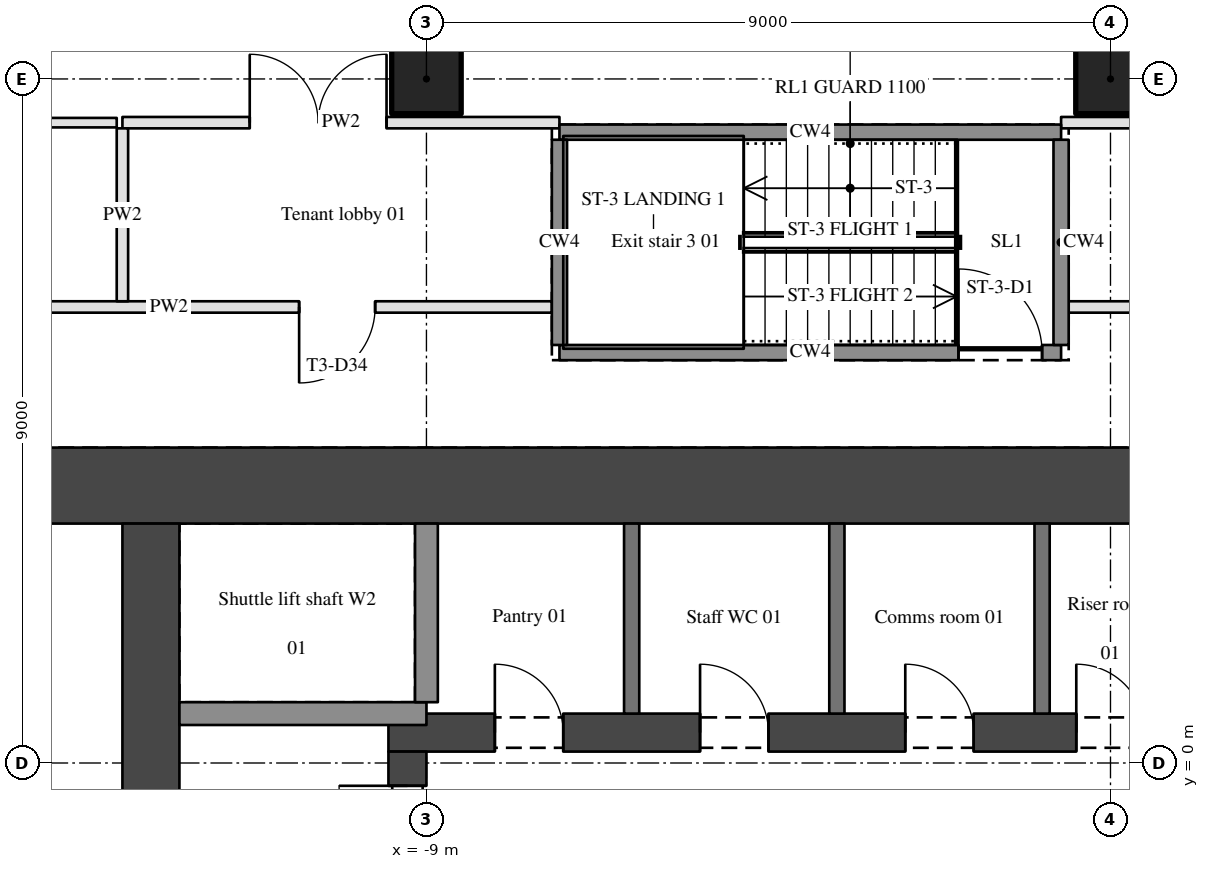
"""IFC4 building model, lengths in metres.
Left out: names, types, materials, properties, quantities, classifications, styles, units other than length and angle.
Written with IfcOpenShell. Run it as: python <this file> out.ifc"""

import sys

from ifc_helpers import new_model, si_unit, direction, frame, frame_2d, origin, origin_2d, place, context, subcontext, project, spatial, rectangle, hollow_circle, extrude, element, fill, save


model = new_model("IFC4")
c1 = context("Model", 3, precision=1e-05, world=origin(), true_north=direction((0.0, 1.0)))
c2 = subcontext(c1, "Body", "Model", "MODEL_VIEW")
j1 = project(units=[si_unit("LENGTHUNIT", "METRE"), si_unit("PLANEANGLEUNIT", "RADIAN")], contexts=[c1])
p1 = place(None, origin())
s1 = spatial("IfcSite", under=j1, at=p1, CompositionType="ELEMENT")
p2 = place(p1, origin())
s2 = spatial("IfcBuilding", under=s1, at=p2, CompositionType="ELEMENT")
p3 = place(p2, frame((0.0, 0.0, 53.7)))
s3 = spatial("IfcBuildingStorey", under=s2, at=p3, CompositionType="ELEMENT", Elevation=53.7)
for number, where, z_axis, x_axis in (
    (1, (-9.0, 9.0, 0.0), (0.0, 0.0, 1.0), (1.0, 0.0, 0.0)),
    (2, (0.0, 9.0, 0.0), (0.0, 0.0, 1.0), (1.0, 0.0, 0.0)),
):
    element("IfcColumn", number, at=place(p3, frame(where, z_axis=z_axis, x_axis=x_axis)), inside=s3, PredefinedType="COLUMN", context=c2, shape_type="SweptSolid", body=[
        extrude(hollow_circle(Radius=0.457, WallThickness=0.05, at=origin_2d()), origin(), (0.0, 0.0, 1.0), 3.9),
    ])
p4 = place(p3, frame((-15.0, 3.65, 0.0), z_axis=(0.0, 0.0, 1.0), x_axis=(1.0, 0.0, 0.0)))
e3 = element("IfcWall", 3, at=p4, inside=s3, PredefinedType="SHEAR", context=c2, shape_type="SweptSolid", body=[
    extrude(rectangle(XDim=30.0, YDim=1.0, at=frame_2d((15.0, 0.0))), origin(), (0.0, 0.0, 1.0), 3.9),
])
p5 = place(p3, frame((-12.625, -11.5, 0.0), z_axis=(0.0, 0.0, 1.0), x_axis=(0.0, 1.0, 0.0)))
e4 = element("IfcWall", 4, at=p5, inside=s3, PredefinedType="SHEAR", context=c2, shape_type="SweptSolid", body=[
    extrude(rectangle(XDim=14.65, YDim=0.75, at=frame_2d((7.325, 0.0))), origin(), (0.0, 0.0, 1.0), 3.9),
])
p6 = place(p5, frame((10.05, 0.0, 0.0)))
e5 = element("IfcOpeningElement", 5, at=p6, cuts=e4, PredefinedType="OPENING", context=c2, shape_type="SweptSolid", body=[
    extrude(rectangle(XDim=0.9, YDim=2.1, at=frame_2d((0.45, 1.05))), frame((0.0, 0.385, 0.0), z_axis=(0.0, -1.0, 0.0), x_axis=(1.0, 0.0, 0.0)), (0.0, 0.0, 1.0), 0.77),
])
p7 = place(p3, frame((-9.5, 0.4, 0.0), z_axis=(0.0, 0.0, 1.0), x_axis=(1.0, 0.0, 0.0)))
e6 = element("IfcWall", 6, at=p7, inside=s3, PredefinedType="SHEAR", context=c2, shape_type="SweptSolid", body=[
    extrude(rectangle(XDim=19.0, YDim=0.5, at=frame_2d((9.5, 0.0))), origin(), (0.0, 0.0, 1.0), 3.9),
])
p8 = place(p7, frame((1.4, 0.0, 0.0)))
e7 = element("IfcOpeningElement", 7, at=p8, cuts=e6, PredefinedType="OPENING", context=c2, shape_type="SweptSolid", body=[
    extrude(rectangle(XDim=0.9, YDim=2.1, at=frame_2d((0.45, 1.05))), frame((0.0, 0.26, 0.0), z_axis=(0.0, -1.0, 0.0), x_axis=(1.0, 0.0, 0.0)), (0.0, 0.0, 1.0), 0.52),
])
p9 = place(p7, frame((4.1, 0.0, 0.0)))
e8 = element("IfcOpeningElement", 8, at=p9, cuts=e6, PredefinedType="OPENING", context=c2, shape_type="SweptSolid", body=[
    extrude(rectangle(XDim=0.9, YDim=2.1, at=frame_2d((0.45, 1.05))), frame((0.0, 0.26, 0.0), z_axis=(0.0, -1.0, 0.0), x_axis=(1.0, 0.0, 0.0)), (0.0, 0.0, 1.0), 0.52),
])
p10 = place(p7, frame((6.8, 0.0, 0.0)))
e9 = element("IfcOpeningElement", 9, at=p10, cuts=e6, PredefinedType="OPENING", context=c2, shape_type="SweptSolid", body=[
    extrude(rectangle(XDim=0.9, YDim=2.1, at=frame_2d((0.45, 1.05))), frame((0.0, 0.26, 0.0), z_axis=(0.0, -1.0, 0.0), x_axis=(1.0, 0.0, 0.0)), (0.0, 0.0, 1.0), 0.52),
])
p11 = place(p7, frame((11.3, 0.0, 0.0)))
e10 = element("IfcOpeningElement", 10, at=p11, cuts=e6, PredefinedType="OPENING", context=c2, shape_type="SweptSolid", body=[
    extrude(rectangle(XDim=0.9, YDim=2.1, at=frame_2d((0.45, 1.05))), frame((0.0, 0.26, 0.0), z_axis=(0.0, -1.0, 0.0), x_axis=(1.0, 0.0, 0.0)), (0.0, 0.0, 1.0), 0.52),
])
p12 = place(p7, frame((14.0, 0.0, 0.0)))
e11 = element("IfcOpeningElement", 11, at=p12, cuts=e6, PredefinedType="OPENING", context=c2, shape_type="SweptSolid", body=[
    extrude(rectangle(XDim=0.9, YDim=2.1, at=frame_2d((0.45, 1.05))), frame((0.0, 0.26, 0.0), z_axis=(0.0, -1.0, 0.0), x_axis=(1.0, 0.0, 0.0)), (0.0, 0.0, 1.0), 0.52),
])
p13 = place(p7, frame((16.7, 0.0, 0.0)))
e12 = element("IfcOpeningElement", 12, at=p13, cuts=e6, PredefinedType="OPENING", context=c2, shape_type="SweptSolid", body=[
    extrude(rectangle(XDim=0.9, YDim=2.1, at=frame_2d((0.45, 1.05))), frame((0.0, 0.26, 0.0), z_axis=(0.0, -1.0, 0.0), x_axis=(1.0, 0.0, 0.0)), (0.0, 0.0, 1.0), 0.52),
])
p14 = place(p7, frame((9.05, 0.0, 0.0)))
e13 = element("IfcOpeningElement", 13, at=p14, cuts=e6, PredefinedType="OPENING", context=c2, shape_type="SweptSolid", body=[
    extrude(rectangle(XDim=0.9, YDim=2.1, at=frame_2d((0.45, 1.05))), frame((0.0, 0.26, 0.0), z_axis=(0.0, -1.0, 0.0), x_axis=(1.0, 0.0, 0.0)), (0.0, 0.0, 1.0), 0.52),
])
p15 = place(p3, frame((-9.25, -11.5, 0.0), z_axis=(0.0, 0.0, 1.0), x_axis=(0.0, 1.0, 0.0)))
e14 = element("IfcWall", 14, at=p15, inside=s3, PredefinedType="SHEAR", context=c2, shape_type="SweptSolid", body=[
    extrude(rectangle(XDim=11.65, YDim=0.5, at=frame_2d((5.825, 0.0))), origin(), (0.0, 0.0, 1.0), 3.9),
])
p16 = place(p15, frame((9.4, 0.0, 0.0)))
e15 = element("IfcOpeningElement", 15, at=p16, cuts=e14, PredefinedType="OPENING", context=c2, shape_type="SweptSolid", body=[
    extrude(rectangle(XDim=1.8, YDim=2.1, at=frame_2d((0.9, 1.05))), frame((0.0, 0.26, 0.0), z_axis=(0.0, -1.0, 0.0), x_axis=(1.0, 0.0, 0.0)), (0.0, 0.0, 1.0), 0.52),
])
p17 = place(p15, frame((5.25, 0.0, 0.0)))
e16 = element("IfcOpeningElement", 16, at=p17, cuts=e14, PredefinedType="OPENING", context=c2, shape_type="SweptSolid", body=[
    extrude(rectangle(XDim=1.1, YDim=2.1, at=frame_2d((0.55, 1.05))), frame((0.0, 0.26, 0.0), z_axis=(0.0, -1.0, 0.0), x_axis=(1.0, 0.0, 0.0)), (0.0, 0.0, 1.0), 0.52),
])
p18 = place(p3, frame((-9.0, 0.65, 0.0), z_axis=(0.0, 0.0, 1.0), x_axis=(-1.0, 0.0, 0.0)))
e17 = element("IfcWall", 17, at=p18, inside=s3, PredefinedType="SHEAR", context=c2, shape_type="SweptSolid", body=[
    extrude(rectangle(XDim=3.25, YDim=0.3, at=frame_2d((1.625, 0.0))), origin(), (0.0, 0.0, 1.0), 3.9),
])
p19 = place(p3, frame((-7.25, 5.4, 0.0), z_axis=(0.0, 0.0, 1.0), x_axis=(1.0, 0.0, 0.0)))
e18 = element("IfcWall", 18, at=p19, inside=s3, PredefinedType="SHEAR", context=c2, shape_type="SweptSolid", body=[
    extrude(rectangle(XDim=6.6, YDim=0.2, at=frame_2d((3.3, 0.0))), origin(), (0.0, 0.0, 1.0), 3.9),
])
p20 = place(p19, frame((5.25, 0.0, 0.0)))
e19 = element("IfcOpeningElement", 19, at=p20, cuts=e18, PredefinedType="OPENING", context=c2, shape_type="SweptSolid", body=[
    extrude(rectangle(XDim=1.1, YDim=2.1, at=frame_2d((0.55, 1.05))), frame((0.0, 0.11, 0.0), z_axis=(0.0, -1.0, 0.0), x_axis=(1.0, 0.0, 0.0)), (0.0, 0.0, 1.0), 0.22),
])
p21 = place(p3, frame((-7.35, 6.0, 0.0), z_axis=(0.0, 0.0, 1.0), x_axis=(-1.0, 0.0, 0.0)))
e20 = element("IfcWall", 20, at=p21, inside=s3, PredefinedType="PARTITIONING", context=c2, shape_type="SweptSolid", body=[
    extrude(rectangle(XDim=10.075, YDim=0.15, at=frame_2d((5.038, 0.0))), origin(), (0.0, 0.0, 1.0), 2.96),
])
p22 = place(p21, frame((2.325, 0.0, 0.0)))
e21 = element("IfcOpeningElement", 21, at=p22, cuts=e20, PredefinedType="OPENING", context=c2, shape_type="SweptSolid", body=[
    extrude(rectangle(XDim=1.0, YDim=2.1, at=frame_2d((0.5, 1.05))), frame((0.0, 0.085, 0.0), z_axis=(0.0, -1.0, 0.0), x_axis=(1.0, 0.0, 0.0)), (0.0, 0.0, 1.0), 0.17),
])
p23 = place(p21, frame((7.413, 0.0, 0.0)))
e22 = element("IfcOpeningElement", 22, at=p23, cuts=e20, PredefinedType="OPENING", context=c2, shape_type="SweptSolid", body=[
    extrude(rectangle(XDim=0.9, YDim=2.1, at=frame_2d((0.45, 1.05))), frame((0.0, 0.085, 0.0), z_axis=(0.0, -1.0, 0.0), x_axis=(1.0, 0.0, 0.0)), (0.0, 0.0, 1.0), 0.17),
])
p24 = place(p3, frame((-0.55, 6.0, 0.0), z_axis=(0.0, 0.0, 1.0), x_axis=(1.0, 0.0, 0.0)))
e23 = element("IfcWall", 23, at=p24, inside=s3, PredefinedType="PARTITIONING", context=c2, shape_type="SweptSolid", body=[
    extrude(rectangle(XDim=17.975, YDim=0.15, at=frame_2d((8.988, 0.0))), origin(), (0.0, 0.0, 1.0), 2.96),
])
p25 = place(p24, frame((1.525, 0.0, 0.0)))
e24 = element("IfcOpeningElement", 24, at=p25, cuts=e23, PredefinedType="OPENING", context=c2, shape_type="SweptSolid", body=[
    extrude(rectangle(XDim=0.9, YDim=2.1, at=frame_2d((0.45, 1.05))), frame((0.0, 0.085, 0.0), z_axis=(0.0, -1.0, 0.0), x_axis=(1.0, 0.0, 0.0)), (0.0, 0.0, 1.0), 0.17),
])
p26 = place(p24, frame((5.8, 0.0, 0.0)))
e25 = element("IfcOpeningElement", 25, at=p26, cuts=e23, PredefinedType="OPENING", context=c2, shape_type="SweptSolid", body=[
    extrude(rectangle(XDim=0.9, YDim=2.1, at=frame_2d((0.45, 1.05))), frame((0.0, 0.085, 0.0), z_axis=(0.0, -1.0, 0.0), x_axis=(1.0, 0.0, 0.0)), (0.0, 0.0, 1.0), 0.17),
])
p27 = place(p24, frame((9.55, 0.0, 0.0)))
e26 = element("IfcOpeningElement", 26, at=p27, cuts=e23, PredefinedType="OPENING", context=c2, shape_type="SweptSolid", body=[
    extrude(rectangle(XDim=1.0, YDim=2.1, at=frame_2d((0.5, 1.05))), frame((0.0, 0.085, 0.0), z_axis=(0.0, -1.0, 0.0), x_axis=(1.0, 0.0, 0.0)), (0.0, 0.0, 1.0), 0.17),
])
p28 = place(p24, frame((12.6, 0.0, 0.0)))
e27 = element("IfcOpeningElement", 27, at=p28, cuts=e23, PredefinedType="OPENING", context=c2, shape_type="SweptSolid", body=[
    extrude(rectangle(XDim=0.9, YDim=2.1, at=frame_2d((0.45, 1.05))), frame((0.0, 0.085, 0.0), z_axis=(0.0, -1.0, 0.0), x_axis=(1.0, 0.0, 0.0)), (0.0, 0.0, 1.0), 0.17),
])
p29 = place(p24, frame((15.812, 0.0, 0.0)))
e28 = element("IfcOpeningElement", 28, at=p29, cuts=e23, PredefinedType="OPENING", context=c2, shape_type="SweptSolid", body=[
    extrude(rectangle(XDim=0.9, YDim=2.1, at=frame_2d((0.45, 1.05))), frame((0.0, 0.085, 0.0), z_axis=(0.0, -1.0, 0.0), x_axis=(1.0, 0.0, 0.0)), (0.0, 0.0, 1.0), 0.17),
])
p30 = place(p3, frame((-7.25, 8.3, 0.0), z_axis=(0.0, 0.0, 1.0), x_axis=(1.0, 0.0, 0.0)))
e29 = element("IfcWall", 29, at=p30, inside=s3, PredefinedType="SHEAR", context=c2, shape_type="SweptSolid", body=[
    extrude(rectangle(XDim=6.6, YDim=0.2, at=frame_2d((3.3, 0.0))), origin(), (0.0, 0.0, 1.0), 3.9),
])
p31 = place(p3, frame((-17.363, 8.425, 0.0), z_axis=(0.0, 0.0, 1.0), x_axis=(1.0, 0.0, 0.0)))
e30 = element("IfcWall", 30, at=p31, inside=s3, PredefinedType="PARTITIONING", context=c2, shape_type="SweptSolid", body=[
    extrude(rectangle(XDim=4.288, YDim=0.125, at=frame_2d((2.144, 0.0))), origin(), (0.0, 0.0, 1.0), 2.96),
])
p32 = place(p3, frame((-13.0, 8.425, 0.0), z_axis=(0.0, 0.0, 1.0), x_axis=(1.0, 0.0, 0.0)))
e31 = element("IfcWall", 31, at=p32, inside=s3, PredefinedType="PARTITIONING", context=c2, shape_type="SweptSolid", body=[
    extrude(rectangle(XDim=5.75, YDim=0.15, at=frame_2d((2.875, 0.0))), origin(), (0.0, 0.0, 1.0), 2.96),
])
p33 = place(p32, frame((1.675, 0.0, 0.0)))
e32 = element("IfcOpeningElement", 32, at=p33, cuts=e31, PredefinedType="OPENING", context=c2, shape_type="SweptSolid", body=[
    extrude(rectangle(XDim=1.8, YDim=2.1, at=frame_2d((0.9, 1.05))), frame((0.0, 0.085, 0.0), z_axis=(0.0, -1.0, 0.0), x_axis=(1.0, 0.0, 0.0)), (0.0, 0.0, 1.0), 0.17),
])
p34 = place(p3, frame((-0.65, 8.425, 0.0), z_axis=(0.0, 0.0, 1.0), x_axis=(1.0, 0.0, 0.0)))
e33 = element("IfcWall", 33, at=p34, inside=s3, PredefinedType="PARTITIONING", context=c2, shape_type="SweptSolid", body=[
    extrude(rectangle(XDim=11.65, YDim=0.15, at=frame_2d((5.825, 0.0))), origin(), (0.0, 0.0, 1.0), 2.96),
])
p35 = place(p3, frame((-13.0, 6.075, 0.0), z_axis=(0.0, 0.0, 1.0), x_axis=(0.0, 1.0, 0.0)))
e34 = element("IfcWall", 34, at=p35, inside=s3, PredefinedType="PARTITIONING", context=c2, shape_type="SweptSolid", body=[
    extrude(rectangle(XDim=2.275, YDim=0.15, at=frame_2d((1.138, 0.0))), origin(), (0.0, 0.0, 1.0), 2.96),
])
p36 = place(p3, frame((-9.0, 0.8, 0.0), z_axis=(0.0, 0.0, 1.0), x_axis=(0.0, 1.0, 0.0)))
e35 = element("IfcWall", 35, at=p36, inside=s3, PredefinedType="SHEAR", context=c2, shape_type="SweptSolid", body=[
    extrude(rectangle(XDim=2.35, YDim=0.3, at=frame_2d((1.175, 0.0))), origin(), (0.0, 0.0, 1.0), 3.9),
])
p37 = place(p3, frame((-7.25, 5.5, 0.0), z_axis=(0.0, 0.0, 1.0), x_axis=(0.0, 1.0, 0.0)))
e36 = element("IfcWall", 36, at=p37, inside=s3, PredefinedType="SHEAR", context=c2, shape_type="SweptSolid", body=[
    extrude(rectangle(XDim=2.7, YDim=0.2, at=frame_2d((1.35, 0.0))), origin(), (0.0, 0.0, 1.0), 3.9),
])
for number, where, z_axis, x_axis in (
    (37, (-6.3, 0.65, 0.0), (0.0, 0.0, 1.0), (0.0, 1.0, 0.0)),
    (38, (-3.6, 0.65, 0.0), (0.0, 0.0, 1.0), (0.0, 1.0, 0.0)),
    (39, (-0.9, 0.65, 0.0), (0.0, 0.0, 1.0), (0.0, 1.0, 0.0)),
):
    element("IfcWall", number, at=place(p3, frame(where, z_axis=z_axis, x_axis=x_axis)), inside=s3, PredefinedType="SOLIDWALL", context=c2, shape_type="SweptSolid", body=[
        extrude(rectangle(XDim=2.5, YDim=0.2, at=frame_2d((1.25, 0.0))), origin(), (0.0, 0.0, 1.0), 3.6),
    ])
p38 = place(p3, frame((-0.65, 5.5, 0.0), z_axis=(0.0, 0.0, 1.0), x_axis=(0.0, 1.0, 0.0)))
e40 = element("IfcWall", 40, at=p38, inside=s3, PredefinedType="SHEAR", context=c2, shape_type="SweptSolid", body=[
    extrude(rectangle(XDim=2.7, YDim=0.2, at=frame_2d((1.35, 0.0))), origin(), (0.0, 0.0, 1.0), 3.9),
])
p39 = place(p22, origin())
e41 = element("IfcDoor", 41, at=p39, inside=s3, OperationType="SINGLE_SWING_RIGHT", PredefinedType="DOOR", context=c2, shape_type="SweptSolid", body=[
    extrude(rectangle(XDim=1.0, YDim=2.1, at=frame_2d((0.5, 1.05))), frame((0.0, 0.025, 0.0), z_axis=(0.0, -1.0, 0.0), x_axis=(1.0, 0.0, 0.0)), (0.0, 0.0, 1.0), 0.05),
])
fill(e21, e41)
p40 = place(p16, origin())
e42 = element("IfcDoor", 42, at=p40, inside=s3, OperationType="DOUBLE_DOOR_SINGLE_SWING", PredefinedType="DOOR", context=c2, shape_type="SweptSolid", body=[
    extrude(rectangle(XDim=1.8, YDim=2.1, at=frame_2d((0.9, 1.05))), frame((0.0, 0.025, 0.0), z_axis=(0.0, -1.0, 0.0), x_axis=(1.0, 0.0, 0.0)), (0.0, 0.0, 1.0), 0.05),
])
fill(e15, e42)
p41 = place(p33, origin())
e43 = element("IfcDoor", 43, at=p41, inside=s3, OperationType="DOUBLE_DOOR_SINGLE_SWING", PredefinedType="DOOR", context=c2, shape_type="SweptSolid", body=[
    extrude(rectangle(XDim=1.8, YDim=2.1, at=frame_2d((0.9, 1.05))), frame((0.0, 0.025, 0.0), z_axis=(0.0, -1.0, 0.0), x_axis=(1.0, 0.0, 0.0)), (0.0, 0.0, 1.0), 0.05),
])
fill(e32, e43)
p42 = place(p20, origin())
e44 = element("IfcDoor", 44, at=p42, inside=s3, OperationType="SINGLE_SWING_LEFT", PredefinedType="DOOR", context=c2, shape_type="SweptSolid", body=[
    extrude(rectangle(XDim=1.1, YDim=2.1, at=frame_2d((0.55, 1.05))), frame((0.0, 0.025, 0.0), z_axis=(0.0, -1.0, 0.0), x_axis=(1.0, 0.0, 0.0)), (0.0, 0.0, 1.0), 0.05),
])
fill(e19, e44)
p43 = place(p8, origin())
e45 = element("IfcDoor", 45, at=p43, inside=s3, OperationType="SINGLE_SWING_LEFT", PredefinedType="DOOR", context=c2, shape_type="SweptSolid", body=[
    extrude(rectangle(XDim=0.9, YDim=2.1, at=frame_2d((0.45, 1.05))), frame((0.0, 0.025, 0.0), z_axis=(0.0, -1.0, 0.0), x_axis=(1.0, 0.0, 0.0)), (0.0, 0.0, 1.0), 0.05),
])
fill(e7, e45)
p44 = place(p9, origin())
e46 = element("IfcDoor", 46, at=p44, inside=s3, OperationType="SINGLE_SWING_LEFT", PredefinedType="DOOR", context=c2, shape_type="SweptSolid", body=[
    extrude(rectangle(XDim=0.9, YDim=2.1, at=frame_2d((0.45, 1.05))), frame((0.0, 0.025, 0.0), z_axis=(0.0, -1.0, 0.0), x_axis=(1.0, 0.0, 0.0)), (0.0, 0.0, 1.0), 0.05),
])
fill(e8, e46)
p45 = place(p10, origin())
e47 = element("IfcDoor", 47, at=p45, inside=s3, OperationType="SINGLE_SWING_LEFT", PredefinedType="DOOR", context=c2, shape_type="SweptSolid", body=[
    extrude(rectangle(XDim=0.9, YDim=2.1, at=frame_2d((0.45, 1.05))), frame((0.0, 0.025, 0.0), z_axis=(0.0, -1.0, 0.0), x_axis=(1.0, 0.0, 0.0)), (0.0, 0.0, 1.0), 0.05),
])
fill(e9, e47)
p46 = place(p14, origin())
e48 = element("IfcDoor", 48, at=p46, inside=s3, OperationType="SINGLE_SWING_LEFT", PredefinedType="DOOR", context=c2, shape_type="SweptSolid", body=[
    extrude(rectangle(XDim=0.9, YDim=2.1, at=frame_2d((0.45, 1.05))), frame((0.0, 0.025, 0.0), z_axis=(0.0, -1.0, 0.0), x_axis=(1.0, 0.0, 0.0)), (0.0, 0.0, 1.0), 0.05),
])
fill(e13, e48)
save(model, sys.argv[1])
